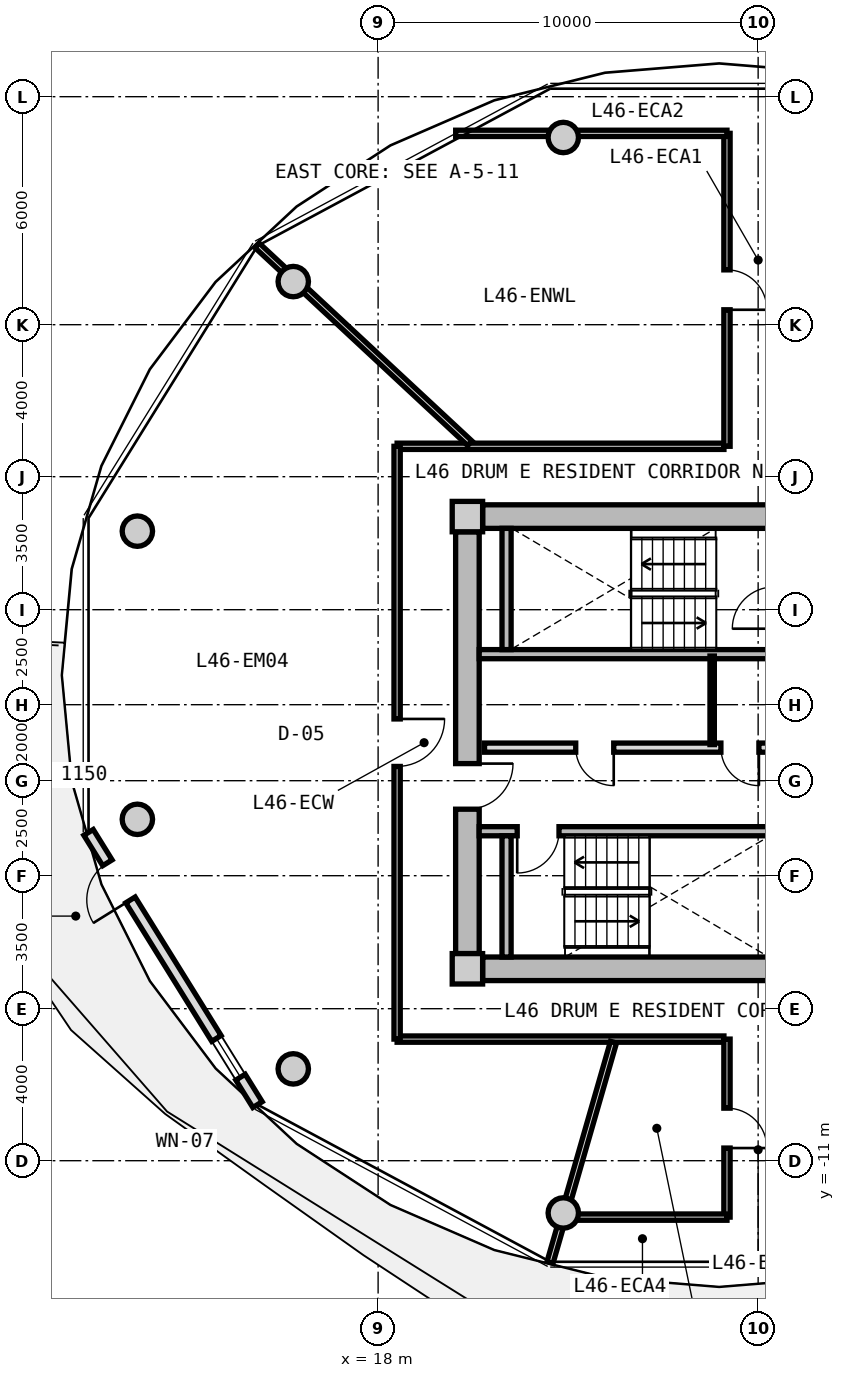
"""IFC4 building model, lengths in metres.
Left out: names, types, materials, properties, quantities, classifications, styles, units other than length and angle.
Written with IfcOpenShell. Run it as: python <this file> out.ifc"""

import sys

from ifc_helpers import new_model, si_unit, direction, frame, frame_2d, origin, origin_2d, place, context, subcontext, project, spatial, rectangle, circle, extrude, source, transform, mapped, element, fill, save


model = new_model("IFC4")
c1 = context("Model", 3, precision=1e-05, world=origin(), true_north=direction((0.0, 1.0)))
c2 = subcontext(c1, "Body", "Model", "MODEL_VIEW")
j1 = project(units=[si_unit("LENGTHUNIT", "METRE"), si_unit("PLANEANGLEUNIT", "RADIAN")], contexts=[c1])
p1 = place(None, origin())
s1 = spatial("IfcSite", under=j1, at=p1, CompositionType="ELEMENT")
p2 = place(p1, origin())
s2 = spatial("IfcBuilding", under=s1, at=p2, CompositionType="ELEMENT")
p3 = place(p2, frame((0.0, 0.0, 149.55)))
s3 = spatial("IfcBuildingStorey", under=s2, at=p3, CompositionType="ELEMENT", Elevation=149.55)
m1 = source(origin(), c2, "Body", "SweptSolid", [
    extrude(rectangle(XDim=0.8, YDim=0.8, at=origin_2d()), origin(), (0.0, 0.0, 1.0), 3.05),
])
for number, where, z_axis, x_axis in (
    (1, (20.35, -5.95, 0.0), (0.0, 0.0, 1.0), (1.0, 0.0, 0.0)),
    (2, (20.35, 5.95, 0.0), (0.0, 0.0, 1.0), (1.0, 0.0, 0.0)),
):
    element("IfcColumn", number, at=place(p3, frame(where, z_axis=z_axis, x_axis=x_axis)), inside=s3, PredefinedType="COLUMN", context=c2, shape_type="MappedRepresentation", body=[
        mapped(m1, transform((0.0, 0.0, 0.0), x_axis=(1.0, 0.0, 0.0), y_axis=(0.0, 1.0, 0.0), z_axis=(0.0, 0.0, 1.0), scale=1.0)),
    ])
m2 = source(origin(), c2, "Body", "SweptSolid", [
    extrude(rectangle(XDim=14.5, YDim=0.62, at=frame_2d((7.25, 0.0))), origin(), (0.0, 0.0, 1.0), 2.81),
])
for number, where, z_axis, x_axis in (
    (3, (20.75, 5.95, 0.0), (0.0, 0.0, 1.0), (1.0, 0.0, 0.0)),
    (4, (35.25, -5.95, 0.0), (0.0, 0.0, 1.0), (-1.0, 0.0, 0.0)),
):
    element("IfcWall", number, at=place(p3, frame(where, z_axis=z_axis, x_axis=x_axis)), inside=s3, PredefinedType="SHEAR", context=c2, shape_type="MappedRepresentation", body=[
        mapped(m2, transform((0.0, 0.0, 0.0), x_axis=(1.0, 0.0, 0.0), y_axis=(0.0, 1.0, 0.0), z_axis=(0.0, 0.0, 1.0), scale=1.0)),
    ])
m3 = source(origin(), c2, "Body", "SweptSolid", [
    extrude(rectangle(XDim=11.1, YDim=0.62, at=frame_2d((5.55, 0.0))), origin(), (0.0, 0.0, 1.0), 2.81),
])
p4 = place(p3, frame((20.35, -5.55, 0.0), z_axis=(0.0, 0.0, 1.0), x_axis=(0.0, 1.0, 0.0)))
e5 = element("IfcWall", 5, at=p4, inside=s3, PredefinedType="SHEAR", context=c2, shape_type="MappedRepresentation", body=[
    mapped(m3, transform((0.0, 0.0, 0.0), x_axis=(1.0, 0.0, 0.0), y_axis=(0.0, 1.0, 0.0), z_axis=(0.0, 0.0, 1.0), scale=1.0)),
])
p5 = place(p4, frame((3.8, 0.0, 0.0)))
e6 = element("IfcOpeningElement", 6, at=p5, cuts=e5, PredefinedType="OPENING", context=c2, shape_type="SweptSolid", body=[
    extrude(rectangle(XDim=1.2, YDim=2.15, at=frame_2d((0.6, 1.075))), frame((0.0, 0.32, 0.0), z_axis=(0.0, -1.0, 0.0), x_axis=(1.0, 0.0, 0.0)), (0.0, 0.0, 1.0), 0.64),
])
m4 = source(origin(), c2, "Body", "SweptSolid", [
    extrude(circle(Radius=0.4, at=origin_2d()), origin(), (0.0, 0.0, 1.0), 3.05),
])
for number, where, z_axis, x_axis in (
    (7, (22.873, 15.926, 0.0), (0.0, 0.0, 1.0), (1.0, 0.0, 0.0)),
    (8, (15.767, 12.135, 0.0), (0.0, 0.0, 1.0), (1.0, 0.0, 0.0)),
    (9, (11.665, 5.567, 0.0), (0.0, 0.0, 1.0), (1.0, 0.0, 0.0)),
    (10, (11.665, -2.016, 0.0), (0.0, 0.0, 1.0), (1.0, 0.0, 0.0)),
    (11, (15.767, -8.584, 0.0), (0.0, 0.0, 1.0), (1.0, 0.0, 0.0)),
    (12, (22.873, -12.375, 0.0), (0.0, 0.0, 1.0), (1.0, 0.0, 0.0)),
):
    element("IfcColumn", number, at=place(p3, frame(where, z_axis=z_axis, x_axis=x_axis)), inside=s3, PredefinedType="COLUMN", context=c2, shape_type="MappedRepresentation", body=[
        mapped(m4, transform((0.0, 0.0, 0.0), x_axis=(1.0, 0.0, 0.0), y_axis=(0.0, 1.0, 0.0), z_axis=(0.0, 0.0, 1.0), scale=1.0)),
    ])
m5 = source(origin(), c2, "Body", "SweptSolid", [
    extrude(rectangle(XDim=8.431, YDim=0.29, at=frame_2d((4.216, 0.0))), origin(), (0.0, 0.0, 1.0), 2.81),
])
p6 = place(p3, frame((14.827, -9.524, 0.0), z_axis=(0.0, 0.0, 1.0), x_axis=(-0.527377998418, 0.849630770855, 0.0)))
e13 = element("IfcWall", 13, at=p6, inside=s3, PredefinedType="SOLIDWALL", context=c2, shape_type="MappedRepresentation", body=[
    mapped(m5, transform((0.0, 0.0, 0.0), x_axis=(1.0, 0.0, 0.0), y_axis=(0.0, 1.0, 0.0), z_axis=(0.0, 0.0, 1.0), scale=1.0)),
])
p7 = place(p6, frame((6.34, 0.0, 0.0)))
e14 = element("IfcOpeningElement", 14, at=p7, cuts=e13, PredefinedType="OPENING", context=c2, shape_type="SweptSolid", body=[
    extrude(rectangle(XDim=1.15, YDim=2.25, at=frame_2d((0.575, 1.125))), frame((0.0, 0.155, 0.0), z_axis=(0.0, -1.0, 0.0), x_axis=(1.0, 0.0, 0.0)), (0.0, 0.0, 1.0), 0.31),
])
p8 = place(p6, frame((0.85, 0.0, 0.85)))
e15 = element("IfcOpeningElement", 15, at=p8, cuts=e13, PredefinedType="OPENING", context=c2, shape_type="SweptSolid", body=[
    extrude(rectangle(XDim=1.2, YDim=1.5, at=frame_2d((0.6, 0.75))), frame((0.0, 0.155, 0.0), z_axis=(0.0, -1.0, 0.0), x_axis=(1.0, 0.0, 0.0)), (0.0, 0.0, 1.0), 0.31),
])
m6 = source(origin(), c2, "Body", "SweptSolid", [
    extrude(rectangle(XDim=7.88, YDim=0.24, at=frame_2d((3.94, 0.0))), origin(), (0.0, 0.0, 1.0), 2.81),
])
p9 = place(p3, frame((20.66, 2.33, 0.0), z_axis=(0.0, 0.0, 1.0), x_axis=(1.0, 0.0, 0.0)))
e16 = element("IfcWall", 16, at=p9, inside=s3, PredefinedType="PARTITIONING", context=c2, shape_type="MappedRepresentation", body=[
    mapped(m6, transform((0.0, 0.0, 0.0), x_axis=(1.0, 0.0, 0.0), y_axis=(0.0, 1.0, 0.0), z_axis=(0.0, 0.0, 1.0), scale=1.0)),
])
m7 = source(origin(), c2, "Body", "SweptSolid", [
    extrude(rectangle(XDim=3.19, YDim=0.24, at=frame_2d((1.595, 0.0))), origin(), (0.0, 0.0, 1.0), 2.81),
])
p10 = place(p3, frame((21.38, 2.45, 0.0), z_axis=(0.0, 0.0, 1.0), x_axis=(0.0, 1.0, 0.0)))
e17 = element("IfcWall", 17, at=p10, inside=s3, PredefinedType="PARTITIONING", context=c2, shape_type="MappedRepresentation", body=[
    mapped(m7, transform((0.0, 0.0, 0.0), x_axis=(1.0, 0.0, 0.0), y_axis=(0.0, 1.0, 0.0), z_axis=(0.0, 0.0, 1.0), scale=1.0)),
])
p11 = place(p3, frame((20.66, -2.33, 0.0), z_axis=(0.0, 0.0, 1.0), x_axis=(1.0, 0.0, 0.0)))
e18 = element("IfcWall", 18, at=p11, inside=s3, PredefinedType="PARTITIONING", context=c2, shape_type="MappedRepresentation", body=[
    mapped(m6, transform((0.0, 0.0, 0.0), x_axis=(1.0, 0.0, 0.0), y_axis=(0.0, 1.0, 0.0), z_axis=(0.0, 0.0, 1.0), scale=1.0)),
])
p12 = place(p11, frame((1.0, 0.0, 0.0)))
e19 = element("IfcOpeningElement", 19, at=p12, cuts=e18, PredefinedType="OPENING", context=c2, shape_type="SweptSolid", body=[
    extrude(rectangle(XDim=1.1, YDim=2.15, at=frame_2d((0.55, 1.075))), frame((0.0, 0.13, 0.0), z_axis=(0.0, -1.0, 0.0), x_axis=(1.0, 0.0, 0.0)), (0.0, 0.0, 1.0), 0.26),
])
p13 = place(p3, frame((21.38, -5.64, 0.0), z_axis=(0.0, 0.0, 1.0), x_axis=(0.0, 1.0, 0.0)))
e20 = element("IfcWall", 20, at=p13, inside=s3, PredefinedType="PARTITIONING", context=c2, shape_type="MappedRepresentation", body=[
    mapped(m7, transform((0.0, 0.0, 0.0), x_axis=(1.0, 0.0, 0.0), y_axis=(0.0, 1.0, 0.0), z_axis=(0.0, 0.0, 1.0), scale=1.0)),
])
m8 = source(origin(), c2, "Body", "SweptSolid", [
    extrude(rectangle(XDim=7.62, YDim=0.24, at=frame_2d((3.81, 0.0))), origin(), (0.0, 0.0, 1.0), 2.795),
])
p14 = place(p3, frame((20.8, -0.13, 0.0), z_axis=(0.0, 0.0, 1.0), x_axis=(1.0, 0.0, 0.0)))
e21 = element("IfcWall", 21, at=p14, inside=s3, PredefinedType="PARTITIONING", context=c2, shape_type="MappedRepresentation", body=[
    mapped(m8, transform((0.0, 0.0, 0.0), x_axis=(1.0, 0.0, 0.0), y_axis=(0.0, 1.0, 0.0), z_axis=(0.0, 0.0, 1.0), scale=1.0)),
])
p15 = place(p14, frame((6.22, 0.0, 0.0)))
e22 = element("IfcOpeningElement", 22, at=p15, cuts=e21, PredefinedType="OPENING", context=c2, shape_type="SweptSolid", body=[
    extrude(rectangle(XDim=1.0, YDim=2.1, at=frame_2d((0.5, 1.05))), frame((0.0, 0.13, 0.0), z_axis=(0.0, -1.0, 0.0), x_axis=(1.0, 0.0, 0.0)), (0.0, 0.0, 1.0), 0.26),
])
p16 = place(p14, frame((2.4, 0.0, 0.0)))
e23 = element("IfcOpeningElement", 23, at=p16, cuts=e21, PredefinedType="OPENING", context=c2, shape_type="SweptSolid", body=[
    extrude(rectangle(XDim=1.0, YDim=2.1, at=frame_2d((0.5, 1.05))), frame((0.0, 0.13, 0.0), z_axis=(0.0, -1.0, 0.0), x_axis=(1.0, 0.0, 0.0)), (0.0, 0.0, 1.0), 0.26),
])
m9 = source(origin(), c2, "Body", "SweptSolid", [
    extrude(rectangle(XDim=2.33, YDim=0.115, at=frame_2d((1.165, 0.0))), origin(), (0.0, 0.0, 1.0), 2.795),
])
p17 = place(p3, frame((26.79, -0.05, 0.0), z_axis=(0.0, 0.0, 1.0), x_axis=(0.0, 1.0, 0.0)))
e24 = element("IfcWall", 24, at=p17, inside=s3, PredefinedType="PARTITIONING", context=c2, shape_type="MappedRepresentation", body=[
    mapped(m9, transform((0.0, 0.0, 0.0), x_axis=(1.0, 0.0, 0.0), y_axis=(0.0, 1.0, 0.0), z_axis=(0.0, 0.0, 1.0), scale=1.0)),
])
m10 = source(origin(), c2, "Body", "SweptSolid", [
    extrude(rectangle(XDim=8.6, YDim=0.165, at=frame_2d((4.3, 0.0))), origin(), (0.0, 0.0, 1.0), 2.795),
])
for number, where, z_axis, x_axis in (
    (25, (18.5, 7.8, 0.0), (0.0, 0.0, 1.0), (1.0, 0.0, 0.0)),
    (26, (27.1, -7.8, 0.0), (0.0, 0.0, 1.0), (-1.0, 0.0, 0.0)),
):
    element("IfcWall", number, at=place(p3, frame(where, z_axis=z_axis, x_axis=x_axis)), inside=s3, PredefinedType="PARTITIONING", context=c2, shape_type="MappedRepresentation", body=[
        mapped(m10, transform((0.0, 0.0, 0.0), x_axis=(1.0, 0.0, 0.0), y_axis=(0.0, 1.0, 0.0), z_axis=(0.0, 0.0, 1.0), scale=1.0)),
    ])
m11 = source(origin(), c2, "Body", "SweptSolid", [
    extrude(rectangle(XDim=15.6, YDim=0.165, at=frame_2d((7.8, 0.0))), origin(), (0.0, 0.0, 1.0), 2.795),
])
p18 = place(p3, frame((18.5, -7.8, 0.0), z_axis=(0.0, 0.0, 1.0), x_axis=(0.0, 1.0, 0.0)))
e27 = element("IfcWall", 27, at=p18, inside=s3, PredefinedType="PARTITIONING", context=c2, shape_type="MappedRepresentation", body=[
    mapped(m11, transform((0.0, 0.0, 0.0), x_axis=(1.0, 0.0, 0.0), y_axis=(0.0, 1.0, 0.0), z_axis=(0.0, 0.0, 1.0), scale=1.0)),
])
p19 = place(p18, frame((7.175, 0.0, 0.0)))
e28 = element("IfcOpeningElement", 28, at=p19, cuts=e27, PredefinedType="OPENING", context=c2, shape_type="SweptSolid", body=[
    extrude(rectangle(XDim=1.25, YDim=2.2, at=frame_2d((0.625, 1.1))), frame((0.0, 0.093, 0.0), z_axis=(0.0, -1.0, 0.0), x_axis=(1.0, 0.0, 0.0)), (0.0, 0.0, 1.0), 0.185),
])
m12 = source(origin(), c2, "Body", "SweptSolid", [
    extrude(rectangle(XDim=7.648, YDim=0.165, at=frame_2d((3.824, 0.0))), origin(), (0.0, 0.0, 1.0), 2.345),
])
p20 = place(p3, frame((20.413, 7.88, 0.0), z_axis=(0.0, 0.0, 1.0), x_axis=(-0.732182665826, 0.681108320213, 0.0)))
e29 = element("IfcWall", 29, at=p20, inside=s3, PredefinedType="PARTITIONING", context=c2, shape_type="MappedRepresentation", body=[
    mapped(m12, transform((0.0, 0.0, 0.0), x_axis=(1.0, 0.0, 0.0), y_axis=(0.0, 1.0, 0.0), z_axis=(0.0, 0.0, 1.0), scale=1.0)),
])
m13 = source(origin(), c2, "Body", "SweptSolid", [
    extrude(rectangle(XDim=6.035, YDim=0.165, at=frame_2d((3.018, 0.0))), origin(), (0.0, 0.0, 1.0), 2.345),
])
p21 = place(p3, frame((24.194, -7.88, 0.0), z_axis=(0.0, 0.0, 1.0), x_axis=(-0.276809454862, -0.960924828329, 0.0)))
e30 = element("IfcWall", 30, at=p21, inside=s3, PredefinedType="PARTITIONING", context=c2, shape_type="MappedRepresentation", body=[
    mapped(m13, transform((0.0, 0.0, 0.0), x_axis=(1.0, 0.0, 0.0), y_axis=(0.0, 1.0, 0.0), z_axis=(0.0, 0.0, 1.0), scale=1.0)),
])
m14 = source(origin(), c2, "Body", "SweptSolid", [
    extrude(rectangle(XDim=8.235, YDim=0.165, at=frame_2d((4.118, 0.0))), origin(), (0.0, 0.0, 1.0), 2.795),
])
p22 = place(p3, frame((27.18, 7.8, 0.0), z_axis=(0.0, 0.0, 1.0), x_axis=(0.0, 1.0, 0.0)))
e31 = element("IfcWall", 31, at=p22, inside=s3, PredefinedType="PARTITIONING", context=c2, shape_type="MappedRepresentation", body=[
    mapped(m14, transform((0.0, 0.0, 0.0), x_axis=(1.0, 0.0, 0.0), y_axis=(0.0, 1.0, 0.0), z_axis=(0.0, 0.0, 1.0), scale=1.0)),
])
p23 = place(p22, frame((3.593, 0.0, 0.0)))
e32 = element("IfcOpeningElement", 32, at=p23, cuts=e31, PredefinedType="OPENING", context=c2, shape_type="SweptSolid", body=[
    extrude(rectangle(XDim=1.05, YDim=2.15, at=frame_2d((0.525, 1.075))), frame((0.0, 0.093, 0.0), z_axis=(0.0, -1.0, 0.0), x_axis=(1.0, 0.0, 0.0)), (0.0, 0.0, 1.0), 0.185),
])
m15 = source(origin(), c2, "Body", "SweptSolid", [
    extrude(rectangle(XDim=7.139, YDim=0.165, at=frame_2d((3.569, 0.0))), origin(), (0.0, 0.0, 1.0), 2.345),
])
p24 = place(p3, frame((20.041, 16.035, 0.0), z_axis=(0.0, 0.0, 1.0), x_axis=(1.0, 0.0, 0.0)))
e33 = element("IfcWall", 33, at=p24, inside=s3, PredefinedType="PARTITIONING", context=c2, shape_type="MappedRepresentation", body=[
    mapped(m15, transform((0.0, 0.0, 0.0), x_axis=(1.0, 0.0, 0.0), y_axis=(0.0, 1.0, 0.0), z_axis=(0.0, 0.0, 1.0), scale=1.0)),
])
m16 = source(origin(), c2, "Body", "SweptSolid", [
    extrude(rectangle(XDim=4.685, YDim=0.165, at=frame_2d((2.342, 0.0))), origin(), (0.0, 0.0, 1.0), 2.795),
])
p25 = place(p3, frame((27.18, -12.485, 0.0), z_axis=(0.0, 0.0, 1.0), x_axis=(0.0, 1.0, 0.0)))
e34 = element("IfcWall", 34, at=p25, inside=s3, PredefinedType="PARTITIONING", context=c2, shape_type="MappedRepresentation", body=[
    mapped(m16, transform((0.0, 0.0, 0.0), x_axis=(1.0, 0.0, 0.0), y_axis=(0.0, 1.0, 0.0), z_axis=(0.0, 0.0, 1.0), scale=1.0)),
])
p26 = place(p25, frame((1.817, 0.0, 0.0)))
e35 = element("IfcOpeningElement", 35, at=p26, cuts=e34, PredefinedType="OPENING", context=c2, shape_type="SweptSolid", body=[
    extrude(rectangle(XDim=1.05, YDim=2.15, at=frame_2d((0.525, 1.075))), frame((0.0, 0.093, 0.0), z_axis=(0.0, -1.0, 0.0), x_axis=(1.0, 0.0, 0.0)), (0.0, 0.0, 1.0), 0.185),
])
m17 = source(origin(), c2, "Body", "SweptSolid", [
    extrude(rectangle(XDim=4.469, YDim=0.165, at=frame_2d((2.234, 0.0))), origin(), (0.0, 0.0, 1.0), 2.345),
])
p27 = place(p3, frame((22.711, -12.485, 0.0), z_axis=(0.0, 0.0, 1.0), x_axis=(1.0, 0.0, 0.0)))
e36 = element("IfcWall", 36, at=p27, inside=s3, PredefinedType="PARTITIONING", context=c2, shape_type="MappedRepresentation", body=[
    mapped(m17, transform((0.0, 0.0, 0.0), x_axis=(1.0, 0.0, 0.0), y_axis=(0.0, 1.0, 0.0), z_axis=(0.0, 0.0, 1.0), scale=1.0)),
])
m18 = source(origin(), c2, "Body", "SweptSolid", [
    extrude(rectangle(XDim=1.15, YDim=2.25, at=frame_2d((0.575, 1.125))), frame((0.0, 0.025, 0.0), z_axis=(0.0, -1.0, 0.0), x_axis=(1.0, 0.0, 0.0)), (0.0, 0.0, 1.0), 0.05),
])
p28 = place(p7, origin())
e37 = element("IfcDoor", 37, at=p28, inside=s3, OperationType="SINGLE_SWING_LEFT", PredefinedType="DOOR", context=c2, shape_type="MappedRepresentation", body=[
    mapped(m18, transform((0.0, 0.0, 0.0), x_axis=(1.0, 0.0, 0.0), y_axis=(0.0, 1.0, 0.0), z_axis=(0.0, 0.0, 1.0), scale=1.0)),
])
fill(e14, e37)
m19 = source(origin(), c2, "Body", "SweptSolid", [
    extrude(rectangle(XDim=1.2, YDim=1.5, at=frame_2d((0.6, 0.75))), frame((0.0, 0.03, 0.0), z_axis=(0.0, -1.0, 0.0), x_axis=(1.0, 0.0, 0.0)), (0.0, 0.0, 1.0), 0.06),
])
p29 = place(p8, origin())
e38 = element("IfcWindow", 38, at=p29, inside=s3, PartitioningType="SINGLE_PANEL", PredefinedType="WINDOW", context=c2, shape_type="MappedRepresentation", body=[
    mapped(m19, transform((0.0, 0.0, 0.0), x_axis=(1.0, 0.0, 0.0), y_axis=(0.0, 1.0, 0.0), z_axis=(0.0, 0.0, 1.0), scale=1.0)),
])
fill(e15, e38)
m20 = source(origin(), c2, "Body", "SweptSolid", [
    extrude(rectangle(XDim=1.1, YDim=2.15, at=frame_2d((0.55, 1.075))), frame((0.0, 0.025, 0.0), z_axis=(0.0, -1.0, 0.0), x_axis=(1.0, 0.0, 0.0)), (0.0, 0.0, 1.0), 0.05),
])
p30 = place(p12, frame((1.1, 0.0, 0.0), z_axis=(0.0, 0.0, 1.0), x_axis=(-1.0, 0.0, 0.0)))
e39 = element("IfcDoor", 39, at=p30, inside=s3, OperationType="SINGLE_SWING_RIGHT", PredefinedType="DOOR", context=c2, shape_type="MappedRepresentation", body=[
    mapped(m20, transform((0.0, 0.0, 0.0), x_axis=(1.0, 0.0, 0.0), y_axis=(0.0, 1.0, 0.0), z_axis=(0.0, 0.0, 1.0), scale=1.0)),
])
fill(e19, e39)
m21 = source(origin(), c2, "Body", "SweptSolid", [
    extrude(rectangle(XDim=1.2, YDim=2.15, at=frame_2d((0.6, 1.075))), frame((0.0, 0.025, 0.0), z_axis=(0.0, -1.0, 0.0), x_axis=(1.0, 0.0, 0.0)), (0.0, 0.0, 1.0), 0.05),
])
p31 = place(p5, frame((1.2, 0.0, 0.0), z_axis=(0.0, 0.0, 1.0), x_axis=(-1.0, 0.0, 0.0)))
e40 = element("IfcDoor", 40, at=p31, inside=s3, OperationType="SINGLE_SWING_LEFT", PredefinedType="DOOR", context=c2, shape_type="MappedRepresentation", body=[
    mapped(m21, transform((0.0, 0.0, 0.0), x_axis=(1.0, 0.0, 0.0), y_axis=(0.0, 1.0, 0.0), z_axis=(0.0, 0.0, 1.0), scale=1.0)),
])
fill(e6, e40)
m22 = source(origin(), c2, "Body", "SweptSolid", [
    extrude(rectangle(XDim=1.0, YDim=2.1, at=frame_2d((0.5, 1.05))), frame((0.0, 0.025, 0.0), z_axis=(0.0, -1.0, 0.0), x_axis=(1.0, 0.0, 0.0)), (0.0, 0.0, 1.0), 0.05),
])
p32 = place(p15, frame((1.0, 0.0, 0.0), z_axis=(0.0, 0.0, 1.0), x_axis=(-1.0, 0.0, 0.0)))
e41 = element("IfcDoor", 41, at=p32, inside=s3, OperationType="SINGLE_SWING_LEFT", PredefinedType="DOOR", context=c2, shape_type="MappedRepresentation", body=[
    mapped(m22, transform((0.0, 0.0, 0.0), x_axis=(1.0, 0.0, 0.0), y_axis=(0.0, 1.0, 0.0), z_axis=(0.0, 0.0, 1.0), scale=1.0)),
])
fill(e22, e41)
p33 = place(p16, frame((1.0, 0.0, 0.0), z_axis=(0.0, 0.0, 1.0), x_axis=(-1.0, 0.0, 0.0)))
e42 = element("IfcDoor", 42, at=p33, inside=s3, OperationType="SINGLE_SWING_LEFT", PredefinedType="DOOR", context=c2, shape_type="MappedRepresentation", body=[
    mapped(m22, transform((0.0, 0.0, 0.0), x_axis=(1.0, 0.0, 0.0), y_axis=(0.0, 1.0, 0.0), z_axis=(0.0, 0.0, 1.0), scale=1.0)),
])
fill(e23, e42)
m23 = source(origin(), c2, "Body", "SweptSolid", [
    extrude(rectangle(XDim=1.05, YDim=2.15, at=frame_2d((0.525, 1.075))), frame((0.0, 0.025, 0.0), z_axis=(0.0, -1.0, 0.0), x_axis=(1.0, 0.0, 0.0)), (0.0, 0.0, 1.0), 0.05),
])
p34 = place(p23, frame((1.05, 0.0, 0.0), z_axis=(0.0, 0.0, 1.0), x_axis=(-1.0, 0.0, 0.0)))
e43 = element("IfcDoor", 43, at=p34, inside=s3, OperationType="SINGLE_SWING_RIGHT", PredefinedType="DOOR", context=c2, shape_type="MappedRepresentation", body=[
    mapped(m23, transform((0.0, 0.0, 0.0), x_axis=(1.0, 0.0, 0.0), y_axis=(0.0, 1.0, 0.0), z_axis=(0.0, 0.0, 1.0), scale=1.0)),
])
fill(e32, e43)
p35 = place(p26, frame((1.05, 0.0, 0.0), z_axis=(0.0, 0.0, 1.0), x_axis=(-1.0, 0.0, 0.0)))
e44 = element("IfcDoor", 44, at=p35, inside=s3, OperationType="SINGLE_SWING_RIGHT", PredefinedType="DOOR", context=c2, shape_type="MappedRepresentation", body=[
    mapped(m23, transform((0.0, 0.0, 0.0), x_axis=(1.0, 0.0, 0.0), y_axis=(0.0, 1.0, 0.0), z_axis=(0.0, 0.0, 1.0), scale=1.0)),
])
fill(e35, e44)
m24 = source(origin(), c2, "Body", "SweptSolid", [
    extrude(rectangle(XDim=1.25, YDim=2.2, at=frame_2d((0.625, 1.1))), frame((0.0, 0.025, 0.0), z_axis=(0.0, -1.0, 0.0), x_axis=(1.0, 0.0, 0.0)), (0.0, 0.0, 1.0), 0.05),
])
p36 = place(p19, frame((1.25, 0.0, 0.0), z_axis=(0.0, 0.0, 1.0), x_axis=(-1.0, 0.0, 0.0)))
e45 = element("IfcDoor", 45, at=p36, inside=s3, OperationType="SINGLE_SWING_LEFT", PredefinedType="DOOR", context=c2, shape_type="MappedRepresentation", body=[
    mapped(m24, transform((0.0, 0.0, 0.0), x_axis=(1.0, 0.0, 0.0), y_axis=(0.0, 1.0, 0.0), z_axis=(0.0, 0.0, 1.0), scale=1.0)),
])
fill(e28, e45)
save(model, sys.argv[1])
